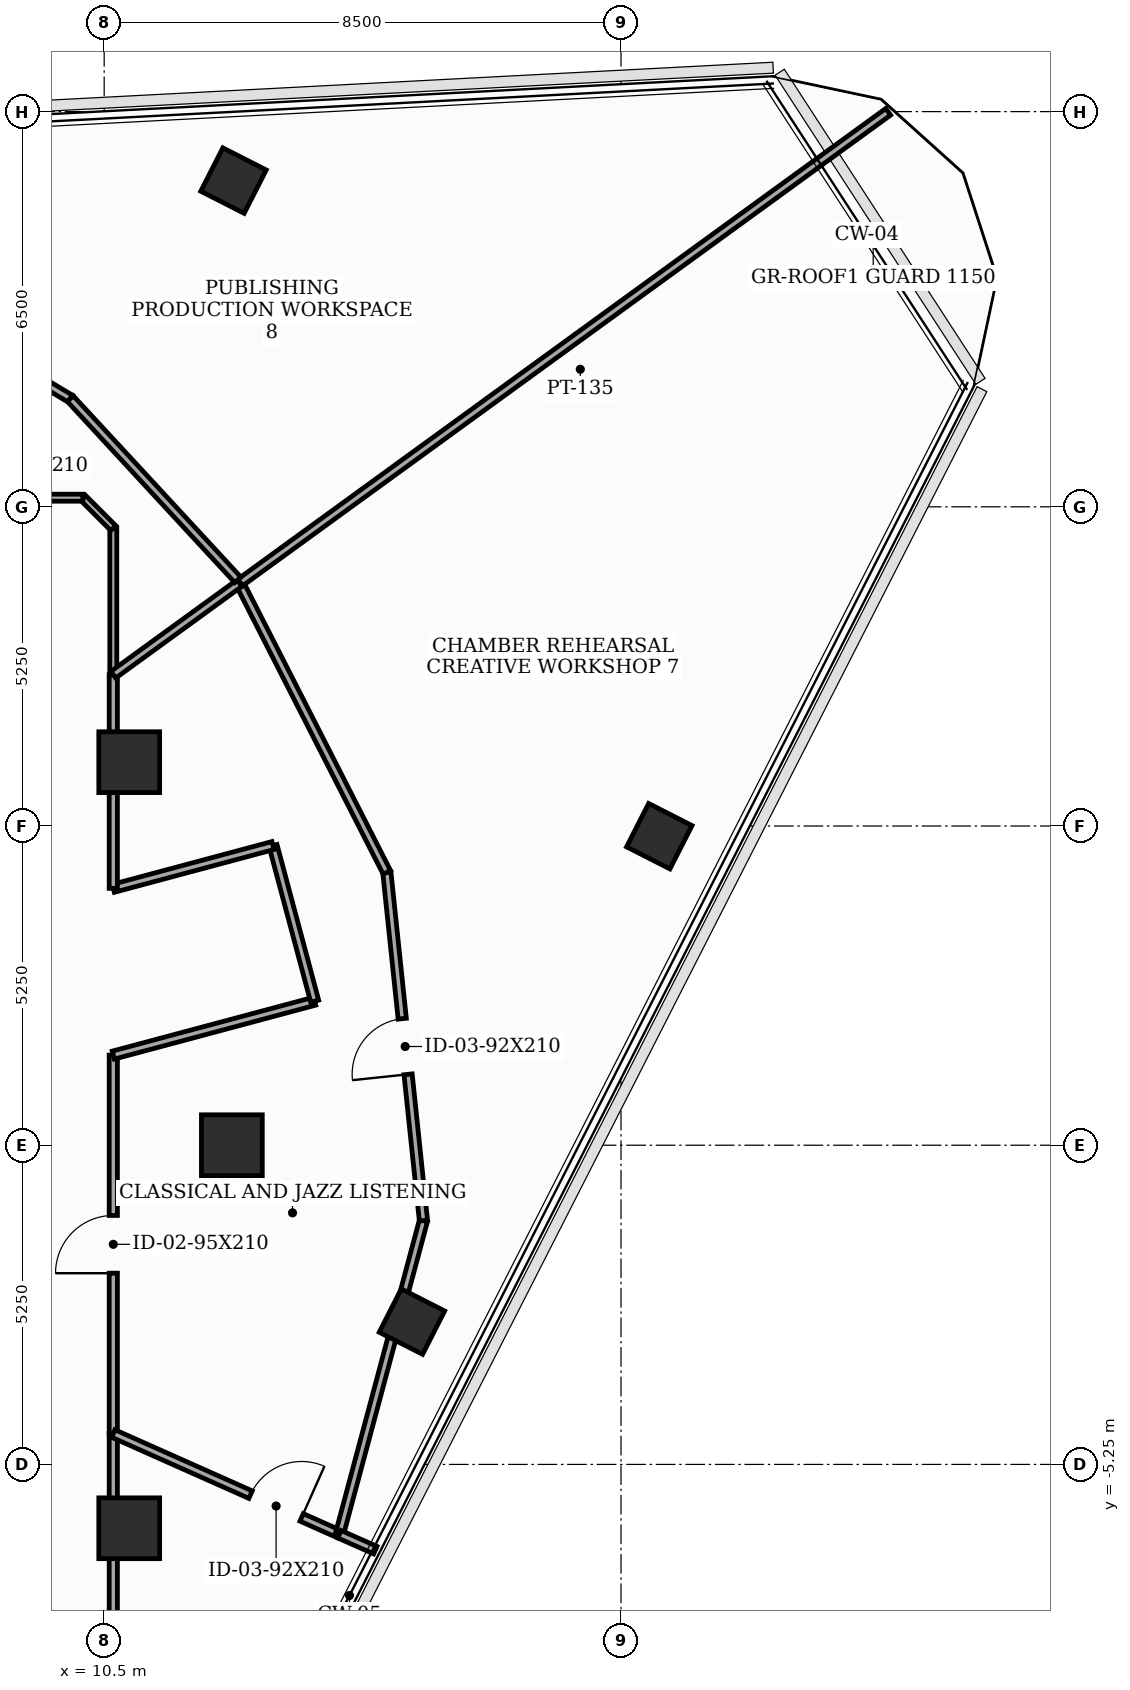
"""IFC4 building model, lengths in metres.
Left out: names, types, materials, properties, quantities, classifications, styles, units other than length and angle.
Written with IfcOpenShell. Run it as: python <this file> out.ifc"""

import sys

from ifc_helpers import new_model, si_unit, direction, frame, frame_2d, origin, origin_2d, place, context, subcontext, project, spatial, rectangle, extrude, element, fill, save


model = new_model("IFC4")
c1 = context("Model", 3, precision=1e-05, world=origin(), true_north=direction((0.0, 1.0)))
c2 = subcontext(c1, "Body", "Model", "MODEL_VIEW")
j1 = project(units=[si_unit("LENGTHUNIT", "METRE"), si_unit("PLANEANGLEUNIT", "RADIAN")], contexts=[c1])
p1 = place(None, origin())
s1 = spatial("IfcSite", under=j1, at=p1, CompositionType="ELEMENT")
p2 = place(p1, origin())
s2 = spatial("IfcBuilding", under=s1, at=p2, CompositionType="ELEMENT")
p3 = place(p2, frame((0.0, 0.0, 248.5)))
s3 = spatial("IfcBuildingStorey", under=s2, at=p3, CompositionType="ELEMENT", Elevation=248.5)
for number, where, z_axis, x_axis in (
    (1, (12.6, 0.0, 0.0), (0.0, 0.0, 1.0), (1.0, 0.0, 0.0)),
    (2, (10.912, 6.3, 0.0), (0.0, 0.0, 1.0), (1.0, 0.0, 0.0)),
    (3, (10.912, -6.3, 0.0), (0.0, 0.0, 1.0), (1.0, 0.0, 0.0)),
):
    element("IfcColumn", number, at=place(p3, frame(where, z_axis=z_axis, x_axis=x_axis)), inside=s3, PredefinedType="COLUMN", context=c2, shape_type="SweptSolid", body=[
        extrude(rectangle(XDim=1.0, YDim=1.0, at=origin_2d()), origin(), (0.0, 0.0, 1.0), 3.7),
    ])
for number, where, z_axis, x_axis in (
    (4, (15.562, -2.901, 0.0), (0.0, 0.0, 1.0), (0.454, 0.891, 0.0)),
    (5, (19.629, 5.082, 0.0), (0.0, 0.0, 1.0), (0.454, 0.891, 0.0)),
    (6, (12.627, 15.865, 0.0), (0.0, 0.0, 1.0), (0.454, 0.891, 0.0)),
):
    element("IfcColumn", number, at=place(p3, frame(where, z_axis=z_axis, x_axis=x_axis)), inside=s3, PredefinedType="COLUMN", context=c2, shape_type="SweptSolid", body=[
        extrude(rectangle(XDim=0.8, YDim=0.8, at=origin_2d()), origin(), (0.0, 0.0, 1.0), 3.7),
    ])
p4 = place(p3, frame((10.65, -4.742, 0.0), z_axis=(0.0, 0.0, 1.0), x_axis=(0.0, 1.0, 0.0)))
e7 = element("IfcWall", 7, at=p4, inside=s3, PredefinedType="PARTITIONING", context=c2, shape_type="SweptSolid", body=[
    extrude(rectangle(XDim=6.224, YDim=0.135, at=frame_2d((3.112, 0.0))), origin(), (0.0, 0.0, 1.0), 2.885),
])
p5 = place(p4, frame((2.637, 0.0, 0.0)))
e8 = element("IfcOpeningElement", 8, at=p5, cuts=e7, PredefinedType="OPENING", context=c2, shape_type="SweptSolid", body=[
    extrude(rectangle(XDim=0.95, YDim=2.1, at=frame_2d((0.475, 1.05))), frame((0.0, 0.077, 0.0), z_axis=(0.0, -1.0, 0.0), x_axis=(1.0, 0.0, 0.0)), (0.0, 0.0, 1.0), 0.155),
])
p6 = place(p3, frame((10.65, 1.482, 0.0), z_axis=(0.0, 0.0, 1.0), x_axis=(0.965961397105, 0.2586862565, 0.0)))
e9 = element("IfcWall", 9, at=p6, inside=s3, PredefinedType="PARTITIONING", context=c2, shape_type="SweptSolid", body=[
    extrude(rectangle(XDim=3.429, YDim=0.135, at=frame_2d((1.714, 0.0))), origin(), (0.0, 0.0, 1.0), 2.885),
])
p7 = place(p3, frame((13.962, 2.369, 0.0), z_axis=(0.0, 0.0, 1.0), x_axis=(-0.258413725385, 0.966034340245, 0.0)))
e10 = element("IfcWall", 10, at=p7, inside=s3, PredefinedType="PARTITIONING", context=c2, shape_type="SweptSolid", body=[
    extrude(rectangle(XDim=2.65, YDim=0.135, at=frame_2d((1.325, 0.0))), origin(), (0.0, 0.0, 1.0), 3.5),
])
p8 = place(p3, frame((13.277, 4.929, 0.0), z_axis=(0.0, 0.0, 1.0), x_axis=(-0.965934830229, -0.258785439601, 0.0)))
e11 = element("IfcWall", 11, at=p8, inside=s3, PredefinedType="PARTITIONING", context=c2, shape_type="SweptSolid", body=[
    extrude(rectangle(XDim=2.72, YDim=0.135, at=frame_2d((1.36, 0.0))), origin(), (0.0, 0.0, 1.0), 2.885),
])
p9 = place(p3, frame((10.65, 4.225, 0.0), z_axis=(0.0, 0.0, 1.0), x_axis=(0.0, 1.0, 0.0)))
e12 = element("IfcWall", 12, at=p9, inside=s3, PredefinedType="PARTITIONING", context=c2, shape_type="SweptSolid", body=[
    extrude(rectangle(XDim=3.513, YDim=0.135, at=frame_2d((1.756, 0.0))), origin(), (0.0, 0.0, 1.0), 2.885),
])
p10 = place(p3, frame((10.65, -10.15, 0.0), z_axis=(0.0, 0.0, 1.0), x_axis=(0.0, 1.0, 0.0)))
e13 = element("IfcWall", 13, at=p10, inside=s3, PredefinedType="PARTITIONING", context=c2, shape_type="SweptSolid", body=[
    extrude(rectangle(XDim=5.408, YDim=0.135, at=frame_2d((2.704, 0.0))), origin(), (0.0, 0.0, 1.0), 2.885),
])
p11 = place(p3, frame((10.65, 7.738, 0.0), z_axis=(0.0, 0.0, 1.0), x_axis=(0.0, 1.0, 0.0)))
e14 = element("IfcWall", 14, at=p11, inside=s3, PredefinedType="PARTITIONING", context=c2, shape_type="SweptSolid", body=[
    extrude(rectangle(XDim=2.412, YDim=0.115, at=frame_2d((1.206, 0.0))), origin(), (0.0, 0.0, 1.0), 3.5),
])
p12 = place(p3, frame((10.65, 10.15, 0.0), z_axis=(0.0, 0.0, 1.0), x_axis=(-0.707106781187, 0.707106781187, 0.0)))
e15 = element("IfcWall", 15, at=p12, inside=s3, PredefinedType="PARTITIONING", context=c2, shape_type="SweptSolid", body=[
    extrude(rectangle(XDim=0.707, YDim=0.115, at=frame_2d((0.354, 0.0))), origin(), (0.0, 0.0, 1.0), 3.5),
])
p13 = place(p3, frame((10.15, 10.65, 0.0), z_axis=(0.0, 0.0, 1.0), x_axis=(-1.0, 0.0, 0.0)))
e16 = element("IfcWall", 16, at=p13, inside=s3, PredefinedType="PARTITIONING", context=c2, shape_type="SweptSolid", body=[
    extrude(rectangle(XDim=5.408, YDim=0.115, at=frame_2d((2.704, 0.0))), origin(), (0.0, 0.0, 1.0), 2.885),
])
p14 = place(p13, frame((0.607, 0.0, 0.0)))
e17 = element("IfcOpeningElement", 17, at=p14, cuts=e16, PredefinedType="OPENING", context=c2, shape_type="SweptSolid", body=[
    extrude(rectangle(XDim=0.95, YDim=2.1, at=frame_2d((0.475, 1.05))), frame((0.0, 0.067, 0.0), z_axis=(0.0, -1.0, 0.0), x_axis=(1.0, 0.0, 0.0)), (0.0, 0.0, 1.0), 0.135),
])
p15 = place(p3, frame((10.65, -4.742, 0.0), z_axis=(0.0, 0.0, 1.0), x_axis=(0.913526929547, -0.406778255309, 0.0)))
e18 = element("IfcWall", 18, at=p15, inside=s3, PredefinedType="PARTITIONING", context=c2, shape_type="SweptSolid", body=[
    extrude(rectangle(XDim=4.071, YDim=0.135, at=frame_2d((2.036, 0.0))), origin(), (0.0, 0.0, 1.0), 2.885),
])
p16 = place(p15, frame((2.471, 0.0, 0.0)))
e19 = element("IfcOpeningElement", 19, at=p16, cuts=e18, PredefinedType="OPENING", context=c2, shape_type="SweptSolid", body=[
    extrude(rectangle(XDim=0.92, YDim=2.1, at=frame_2d((0.46, 1.05))), frame((0.0, 0.077, 0.0), z_axis=(0.0, -1.0, 0.0), x_axis=(1.0, 0.0, 0.0)), (0.0, 0.0, 1.0), 0.155),
])
p17 = place(p3, frame((14.369, -6.398, 0.0), z_axis=(0.0, 0.0, 1.0), x_axis=(0.258820640976, 0.965925398675, 0.0)))
e20 = element("IfcWall", 20, at=p17, inside=s3, PredefinedType="PARTITIONING", context=c2, shape_type="SweptSolid", body=[
    extrude(rectangle(XDim=5.34, YDim=0.135, at=frame_2d((2.67, 0.0))), origin(), (0.0, 0.0, 1.0), 3.025),
])
p18 = place(p3, frame((15.751, -1.24, 0.0), z_axis=(0.0, 0.0, 1.0), x_axis=(-0.104547955553, 0.994519846453, 0.0)))
e21 = element("IfcWall", 21, at=p18, inside=s3, PredefinedType="PARTITIONING", context=c2, shape_type="SweptSolid", body=[
    extrude(rectangle(XDim=5.759, YDim=0.135, at=frame_2d((2.879, 0.0))), origin(), (0.0, 0.0, 1.0), 3.035),
])
p19 = place(p18, frame((2.419, 0.0, 0.0)))
e22 = element("IfcOpeningElement", 22, at=p19, cuts=e21, PredefinedType="OPENING", context=c2, shape_type="SweptSolid", body=[
    extrude(rectangle(XDim=0.92, YDim=2.1, at=frame_2d((0.46, 1.05))), frame((0.0, 0.077, 0.0), z_axis=(0.0, -1.0, 0.0), x_axis=(1.0, 0.0, 0.0)), (0.0, 0.0, 1.0), 0.155),
])
p20 = place(p3, frame((15.149, 4.487, 0.0), z_axis=(0.0, 0.0, 1.0), x_axis=(-0.453912768225, 0.891046126102, 0.0)))
e23 = element("IfcWall", 23, at=p20, inside=s3, PredefinedType="PARTITIONING", context=c2, shape_type="SweptSolid", body=[
    extrude(rectangle(XDim=5.34, YDim=0.135, at=frame_2d((2.67, 0.0))), origin(), (0.0, 0.0, 1.0), 3.185),
])
p21 = place(p3, frame((12.725, 9.245, 0.0), z_axis=(0.0, 0.0, 1.0), x_axis=(-0.809135191367, -0.587622533683, 0.0)))
e24 = element("IfcWall", 24, at=p21, inside=s3, PredefinedType="PARTITIONING", context=c2, shape_type="SweptSolid", body=[
    extrude(rectangle(XDim=2.565, YDim=0.135, at=frame_2d((1.282, 0.0))), origin(), (0.0, 0.0, 1.0), 3.185),
])
p22 = place(p3, frame((14.959, -6.66, 0.0), z_axis=(0.0, 0.0, 1.0), x_axis=(-0.913967286969, 0.405787873586, 0.0)))
e25 = element("IfcWall", 25, at=p22, inside=s3, PredefinedType="PARTITIONING", context=c2, shape_type="SweptSolid", body=[
    extrude(rectangle(XDim=0.646, YDim=0.135, at=frame_2d((0.323, 0.0))), origin(), (0.0, 0.0, 1.0), 3.49),
])
p23 = place(p3, frame((23.394, 16.997, 0.0), z_axis=(0.0, 0.0, 1.0), x_axis=(-0.80901413128, -0.587789192985, 0.0)))
e26 = element("IfcWall", 26, at=p23, inside=s3, PredefinedType="PARTITIONING", context=c2, shape_type="SweptSolid", body=[
    extrude(rectangle(XDim=13.171, YDim=0.135, at=frame_2d((6.586, 0.0))), origin(), (0.0, 0.0, 1.0), 3.035),
])
p24 = place(p3, frame((6.404, 14.384, 0.0), z_axis=(0.0, 0.0, 1.0), x_axis=(0.859464079119, -0.511196143085, 0.0)))
e27 = element("IfcWall", 27, at=p24, inside=s3, PredefinedType="PARTITIONING", context=c2, shape_type="SweptSolid", body=[
    extrude(rectangle(XDim=4.118, YDim=0.135, at=frame_2d((2.059, 0.0))), origin(), (0.0, 0.0, 1.0), 3.035),
])
p25 = place(p24, frame((1.599, 0.0, 0.0)))
e28 = element("IfcOpeningElement", 28, at=p25, cuts=e27, PredefinedType="OPENING", context=c2, shape_type="SweptSolid", body=[
    extrude(rectangle(XDim=0.92, YDim=2.1, at=frame_2d((0.46, 1.05))), frame((0.0, 0.077, 0.0), z_axis=(0.0, -1.0, 0.0), x_axis=(1.0, 0.0, 0.0)), (0.0, 0.0, 1.0), 0.155),
])
p26 = place(p3, frame((9.943, 12.279, 0.0), z_axis=(0.0, 0.0, 1.0), x_axis=(0.678829604912, -0.734295831049, 0.0)))
e29 = element("IfcWall", 29, at=p26, inside=s3, PredefinedType="PARTITIONING", context=c2, shape_type="SweptSolid", body=[
    extrude(rectangle(XDim=4.058, YDim=0.135, at=frame_2d((2.029, 0.0))), origin(), (0.0, 0.0, 1.0), 3.185),
])
p27 = place(p5, origin())
e30 = element("IfcDoor", 30, at=p27, inside=s3, OperationType="SINGLE_SWING_LEFT", PredefinedType="DOOR", context=c2, shape_type="SweptSolid", body=[
    extrude(rectangle(XDim=0.95, YDim=2.1, at=frame_2d((0.475, 1.05))), frame((0.0, 0.025, 0.0), z_axis=(0.0, -1.0, 0.0), x_axis=(1.0, 0.0, 0.0)), (0.0, 0.0, 1.0), 0.05),
])
fill(e8, e30)
p28 = place(p16, origin())
e31 = element("IfcDoor", 31, at=p28, inside=s3, OperationType="SINGLE_SWING_RIGHT", PredefinedType="DOOR", context=c2, shape_type="SweptSolid", body=[
    extrude(rectangle(XDim=0.92, YDim=2.1, at=frame_2d((0.46, 1.05))), frame((0.0, 0.025, 0.0), z_axis=(0.0, -1.0, 0.0), x_axis=(1.0, 0.0, 0.0)), (0.0, 0.0, 1.0), 0.05),
])
fill(e19, e31)
p29 = place(p19, origin())
e32 = element("IfcDoor", 32, at=p29, inside=s3, OperationType="SINGLE_SWING_LEFT", PredefinedType="DOOR", context=c2, shape_type="SweptSolid", body=[
    extrude(rectangle(XDim=0.92, YDim=2.1, at=frame_2d((0.46, 1.05))), frame((0.0, 0.025, 0.0), z_axis=(0.0, -1.0, 0.0), x_axis=(1.0, 0.0, 0.0)), (0.0, 0.0, 1.0), 0.05),
])
fill(e22, e32)
save(model, sys.argv[1])
